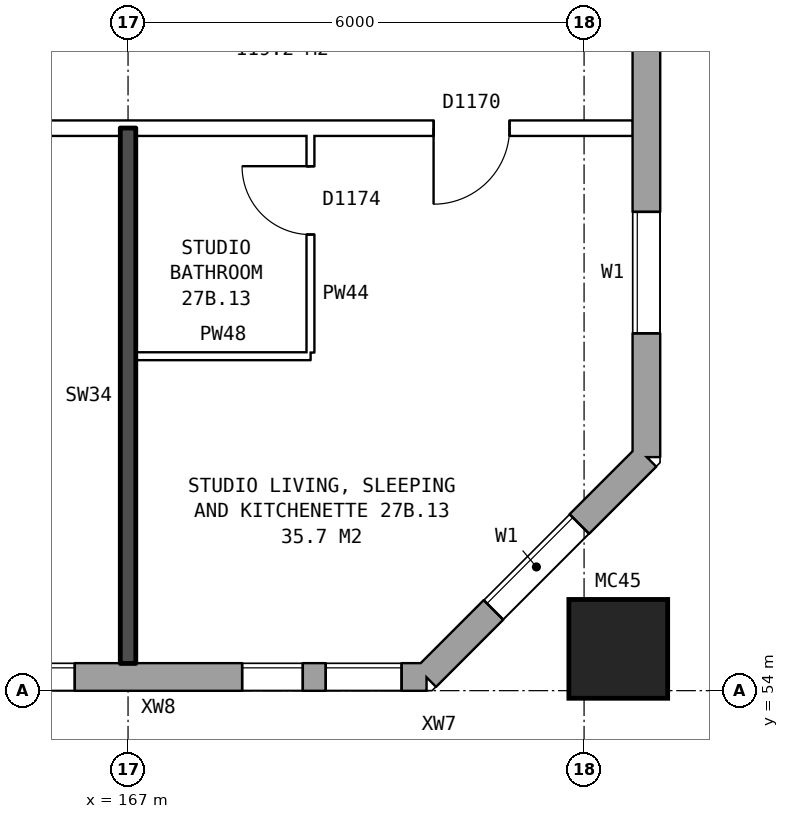
"""IFC4 building model, lengths in metres.
Left out: names, types, materials, properties, quantities, classifications, styles, units other than length and angle.
Written with IfcOpenShell. Run it as: python <this file> out.ifc"""

import sys

from ifc_helpers import new_model, si_unit, direction, frame, frame_2d, origin, origin_2d, place, context, subcontext, project, spatial, rectangle, hollow_rectangle, extrude, element, fill, save


model = new_model("IFC4")
c1 = context("Model", 3, precision=1e-05, world=origin(), true_north=direction((0.0, 1.0)))
c2 = subcontext(c1, "Body", "Model", "MODEL_VIEW")
j1 = project(units=[si_unit("LENGTHUNIT", "METRE"), si_unit("PLANEANGLEUNIT", "RADIAN")], contexts=[c1])
p1 = place(None, origin())
s1 = spatial("IfcSite", under=j1, at=p1, CompositionType="ELEMENT")
p2 = place(p1, origin())
s2 = spatial("IfcBuilding", under=s1, at=p2, CompositionType="ELEMENT")
p3 = place(p2, frame((0.0, 0.0, 99.5)))
s3 = spatial("IfcBuildingStorey", under=s2, at=p3, CompositionType="ELEMENT", Elevation=99.5)
p4 = place(p3, frame((173.45, 54.55, 0.0), z_axis=(0.0, 0.0, 1.0), x_axis=(1.0, 0.0, 0.0)))
e1 = element("IfcColumn", 1, at=p4, inside=s3, PredefinedType="COLUMN", context=c2, shape_type="SweptSolid", body=[
    extrude(hollow_rectangle(XDim=1.3, YDim=1.3, WallThickness=0.07, at=origin_2d()), origin(), (0.0, 0.0, 1.0), 3.1),
])
p5 = place(p3, frame((134.075, 54.18, 0.0), z_axis=(0.0, 0.0, 1.0), x_axis=(1.0, 0.0, 0.0)))
e2 = element("IfcWall", 2, at=p5, inside=s3, PredefinedType="STANDARD", context=c2, shape_type="SweptSolid", body=[
    extrude(rectangle(XDim=36.851, YDim=0.36, at=frame_2d((18.425, 0.0))), origin(), (0.0, 0.0, 1.0), 2.85),
])
p6 = place(p5, frame((0.3, 0.0, 0.8)))
e3 = element("IfcOpeningElement", 3, at=p6, cuts=e2, PredefinedType="OPENING", context=c2, shape_type="SweptSolid", body=[
    extrude(rectangle(XDim=1.0, YDim=1.8, at=frame_2d((0.5, 0.9))), frame((0.0, 0.19, 0.0), z_axis=(0.0, -1.0, 0.0), x_axis=(1.0, 0.0, 0.0)), (0.0, 0.0, 1.0), 0.38),
])
p7 = place(p5, frame((3.575, 0.0, 0.8)))
e4 = element("IfcOpeningElement", 4, at=p7, cuts=e2, PredefinedType="OPENING", context=c2, shape_type="SweptSolid", body=[
    extrude(rectangle(XDim=0.8, YDim=0.9, at=frame_2d((0.4, 0.45))), frame((0.0, 0.19, 0.0), z_axis=(0.0, -1.0, 0.0), x_axis=(1.0, 0.0, 0.0)), (0.0, 0.0, 1.0), 0.38),
])
p8 = place(p5, frame((6.625, 0.0, 0.8)))
e5 = element("IfcOpeningElement", 5, at=p8, cuts=e2, PredefinedType="OPENING", context=c2, shape_type="SweptSolid", body=[
    extrude(rectangle(XDim=1.6, YDim=1.8, at=frame_2d((0.8, 0.9))), frame((0.0, 0.19, 0.0), z_axis=(0.0, -1.0, 0.0), x_axis=(1.0, 0.0, 0.0)), (0.0, 0.0, 1.0), 0.38),
])
p9 = place(p5, frame((9.625, 0.0, 0.8)))
e6 = element("IfcOpeningElement", 6, at=p9, cuts=e2, PredefinedType="OPENING", context=c2, shape_type="SweptSolid", body=[
    extrude(rectangle(XDim=1.6, YDim=1.8, at=frame_2d((0.8, 0.9))), frame((0.0, 0.19, 0.0), z_axis=(0.0, -1.0, 0.0), x_axis=(1.0, 0.0, 0.0)), (0.0, 0.0, 1.0), 0.38),
])
p10 = place(p5, frame((12.625, 0.0, 0.8)))
e7 = element("IfcOpeningElement", 7, at=p10, cuts=e2, PredefinedType="OPENING", context=c2, shape_type="SweptSolid", body=[
    extrude(rectangle(XDim=1.6, YDim=1.8, at=frame_2d((0.8, 0.9))), frame((0.0, 0.19, 0.0), z_axis=(0.0, -1.0, 0.0), x_axis=(1.0, 0.0, 0.0)), (0.0, 0.0, 1.0), 0.38),
])
p11 = place(p5, frame((15.625, 0.0, 0.8)))
e8 = element("IfcOpeningElement", 8, at=p11, cuts=e2, PredefinedType="OPENING", context=c2, shape_type="SweptSolid", body=[
    extrude(rectangle(XDim=1.6, YDim=1.8, at=frame_2d((0.8, 0.9))), frame((0.0, 0.19, 0.0), z_axis=(0.0, -1.0, 0.0), x_axis=(1.0, 0.0, 0.0)), (0.0, 0.0, 1.0), 0.38),
])
p12 = place(p5, frame((18.625, 0.0, 0.8)))
e9 = element("IfcOpeningElement", 9, at=p12, cuts=e2, PredefinedType="OPENING", context=c2, shape_type="SweptSolid", body=[
    extrude(rectangle(XDim=1.6, YDim=1.8, at=frame_2d((0.8, 0.9))), frame((0.0, 0.19, 0.0), z_axis=(0.0, -1.0, 0.0), x_axis=(1.0, 0.0, 0.0)), (0.0, 0.0, 1.0), 0.38),
])
p13 = place(p5, frame((21.625, 0.0, 0.8)))
e10 = element("IfcOpeningElement", 10, at=p13, cuts=e2, PredefinedType="OPENING", context=c2, shape_type="SweptSolid", body=[
    extrude(rectangle(XDim=1.6, YDim=1.8, at=frame_2d((0.8, 0.9))), frame((0.0, 0.19, 0.0), z_axis=(0.0, -1.0, 0.0), x_axis=(1.0, 0.0, 0.0)), (0.0, 0.0, 1.0), 0.38),
])
p14 = place(p5, frame((24.625, 0.0, 0.8)))
e11 = element("IfcOpeningElement", 11, at=p14, cuts=e2, PredefinedType="OPENING", context=c2, shape_type="SweptSolid", body=[
    extrude(rectangle(XDim=1.6, YDim=1.8, at=frame_2d((0.8, 0.9))), frame((0.0, 0.19, 0.0), z_axis=(0.0, -1.0, 0.0), x_axis=(1.0, 0.0, 0.0)), (0.0, 0.0, 1.0), 0.38),
])
p15 = place(p5, frame((27.625, 0.0, 0.8)))
e12 = element("IfcOpeningElement", 12, at=p15, cuts=e2, PredefinedType="OPENING", context=c2, shape_type="SweptSolid", body=[
    extrude(rectangle(XDim=1.6, YDim=1.8, at=frame_2d((0.8, 0.9))), frame((0.0, 0.19, 0.0), z_axis=(0.0, -1.0, 0.0), x_axis=(1.0, 0.0, 0.0)), (0.0, 0.0, 1.0), 0.38),
])
p16 = place(p5, frame((30.625, 0.0, 0.8)))
e13 = element("IfcOpeningElement", 13, at=p16, cuts=e2, PredefinedType="OPENING", context=c2, shape_type="SweptSolid", body=[
    extrude(rectangle(XDim=1.6, YDim=1.8, at=frame_2d((0.8, 0.9))), frame((0.0, 0.19, 0.0), z_axis=(0.0, -1.0, 0.0), x_axis=(1.0, 0.0, 0.0)), (0.0, 0.0, 1.0), 0.38),
])
p17 = place(p5, frame((34.425, 0.0, 1.7)))
e14 = element("IfcOpeningElement", 14, at=p17, cuts=e2, PredefinedType="OPENING", context=c2, shape_type="SweptSolid", body=[
    extrude(rectangle(XDim=0.8, YDim=0.9, at=frame_2d((0.4, 0.45))), frame((0.0, 0.19, 0.0), z_axis=(0.0, -1.0, 0.0), x_axis=(1.0, 0.0, 0.0)), (0.0, 0.0, 1.0), 0.38),
])
p18 = place(p5, frame((1.6, 0.0, 1.7)))
e15 = element("IfcOpeningElement", 15, at=p18, cuts=e2, PredefinedType="OPENING", context=c2, shape_type="SweptSolid", body=[
    extrude(rectangle(XDim=0.8, YDim=0.9, at=frame_2d((0.4, 0.45))), frame((0.0, 0.19, 0.0), z_axis=(0.0, -1.0, 0.0), x_axis=(1.0, 0.0, 0.0)), (0.0, 0.0, 1.0), 0.38),
])
p19 = place(p5, frame((4.675, 0.0, 0.8)))
e16 = element("IfcOpeningElement", 16, at=p19, cuts=e2, PredefinedType="OPENING", context=c2, shape_type="SweptSolid", body=[
    extrude(rectangle(XDim=1.6, YDim=1.8, at=frame_2d((0.8, 0.9))), frame((0.0, 0.19, 0.0), z_axis=(0.0, -1.0, 0.0), x_axis=(1.0, 0.0, 0.0)), (0.0, 0.0, 1.0), 0.38),
])
p20 = place(p5, frame((35.525, 0.0, 0.8)))
e17 = element("IfcOpeningElement", 17, at=p20, cuts=e2, PredefinedType="OPENING", context=c2, shape_type="SweptSolid", body=[
    extrude(rectangle(XDim=1.0, YDim=1.8, at=frame_2d((0.5, 0.9))), frame((0.0, 0.19, 0.0), z_axis=(0.0, -1.0, 0.0), x_axis=(1.0, 0.0, 0.0)), (0.0, 0.0, 1.0), 0.38),
])
p21 = place(p3, frame((170.925, 54.18, 0.0), z_axis=(0.0, 0.0, 1.0), x_axis=(0.707106781187, 0.707106781187, 0.0)))
e18 = element("IfcWall", 18, at=p21, inside=s3, PredefinedType="STANDARD", context=c2, shape_type="SweptSolid", body=[
    extrude(rectangle(XDim=4.094, YDim=0.36, at=frame_2d((2.047, 0.0))), origin(), (0.0, 0.0, 1.0), 2.85),
])
p22 = place(p21, frame((1.247, 0.0, 0.8)))
e19 = element("IfcOpeningElement", 19, at=p22, cuts=e18, PredefinedType="OPENING", context=c2, shape_type="SweptSolid", body=[
    extrude(rectangle(XDim=1.6, YDim=1.8, at=frame_2d((0.8, 0.9))), frame((0.0, 0.19, 0.0), z_axis=(0.0, -1.0, 0.0), x_axis=(1.0, 0.0, 0.0)), (0.0, 0.0, 1.0), 0.38),
])
p23 = place(p3, frame((173.82, 57.075, 0.0), z_axis=(0.0, 0.0, 1.0), x_axis=(0.0, 1.0, 0.0)))
e20 = element("IfcWall", 20, at=p23, inside=s3, PredefinedType="STANDARD", context=c2, shape_type="SweptSolid", body=[
    extrude(rectangle(XDim=25.851, YDim=0.36, at=frame_2d((12.925, 0.0))), origin(), (0.0, 0.0, 1.0), 2.85),
])
p24 = place(p23, frame((1.625, 0.0, 0.8)))
e21 = element("IfcOpeningElement", 21, at=p24, cuts=e20, PredefinedType="OPENING", context=c2, shape_type="SweptSolid", body=[
    extrude(rectangle(XDim=1.6, YDim=1.8, at=frame_2d((0.8, 0.9))), frame((0.0, 0.19, 0.0), z_axis=(0.0, -1.0, 0.0), x_axis=(1.0, 0.0, 0.0)), (0.0, 0.0, 1.0), 0.38),
])
p25 = place(p23, frame((6.175, 0.0, 0.8)))
e22 = element("IfcOpeningElement", 22, at=p25, cuts=e20, PredefinedType="OPENING", context=c2, shape_type="SweptSolid", body=[
    extrude(rectangle(XDim=1.0, YDim=0.9, at=frame_2d((0.5, 0.45))), frame((0.0, 0.19, 0.0), z_axis=(0.0, -1.0, 0.0), x_axis=(1.0, 0.0, 0.0)), (0.0, 0.0, 1.0), 0.38),
])
p26 = place(p23, frame((7.625, 0.0, 0.8)))
e23 = element("IfcOpeningElement", 23, at=p26, cuts=e20, PredefinedType="OPENING", context=c2, shape_type="SweptSolid", body=[
    extrude(rectangle(XDim=1.6, YDim=1.8, at=frame_2d((0.8, 0.9))), frame((0.0, 0.19, 0.0), z_axis=(0.0, -1.0, 0.0), x_axis=(1.0, 0.0, 0.0)), (0.0, 0.0, 1.0), 0.38),
])
p27 = place(p23, frame((10.625, 0.0, 0.8)))
e24 = element("IfcOpeningElement", 24, at=p27, cuts=e20, PredefinedType="OPENING", context=c2, shape_type="SweptSolid", body=[
    extrude(rectangle(XDim=1.6, YDim=1.8, at=frame_2d((0.8, 0.9))), frame((0.0, 0.19, 0.0), z_axis=(0.0, -1.0, 0.0), x_axis=(1.0, 0.0, 0.0)), (0.0, 0.0, 1.0), 0.38),
])
p28 = place(p23, frame((13.625, 0.0, 0.8)))
e25 = element("IfcOpeningElement", 25, at=p28, cuts=e20, PredefinedType="OPENING", context=c2, shape_type="SweptSolid", body=[
    extrude(rectangle(XDim=1.6, YDim=1.8, at=frame_2d((0.8, 0.9))), frame((0.0, 0.19, 0.0), z_axis=(0.0, -1.0, 0.0), x_axis=(1.0, 0.0, 0.0)), (0.0, 0.0, 1.0), 0.38),
])
p29 = place(p23, frame((16.625, 0.0, 0.8)))
e26 = element("IfcOpeningElement", 26, at=p29, cuts=e20, PredefinedType="OPENING", context=c2, shape_type="SweptSolid", body=[
    extrude(rectangle(XDim=1.6, YDim=1.8, at=frame_2d((0.8, 0.9))), frame((0.0, 0.19, 0.0), z_axis=(0.0, -1.0, 0.0), x_axis=(1.0, 0.0, 0.0)), (0.0, 0.0, 1.0), 0.38),
])
p30 = place(p23, frame((9.525, 0.0, 0.8)))
e27 = element("IfcOpeningElement", 27, at=p30, cuts=e20, PredefinedType="OPENING", context=c2, shape_type="SweptSolid", body=[
    extrude(rectangle(XDim=0.8, YDim=1.8, at=frame_2d((0.4, 0.9))), frame((0.0, 0.19, 0.0), z_axis=(0.0, -1.0, 0.0), x_axis=(1.0, 0.0, 0.0)), (0.0, 0.0, 1.0), 0.38),
])
p31 = place(p23, frame((22.625, 0.0, 0.8)))
e28 = element("IfcOpeningElement", 28, at=p31, cuts=e20, PredefinedType="OPENING", context=c2, shape_type="SweptSolid", body=[
    extrude(rectangle(XDim=1.6, YDim=1.8, at=frame_2d((0.8, 0.9))), frame((0.0, 0.19, 0.0), z_axis=(0.0, -1.0, 0.0), x_axis=(1.0, 0.0, 0.0)), (0.0, 0.0, 1.0), 0.38),
])
p32 = place(p23, frame((12.525, 0.0, 0.8)))
e29 = element("IfcOpeningElement", 29, at=p32, cuts=e20, PredefinedType="OPENING", context=c2, shape_type="SweptSolid", body=[
    extrude(rectangle(XDim=0.8, YDim=1.8, at=frame_2d((0.4, 0.9))), frame((0.0, 0.19, 0.0), z_axis=(0.0, -1.0, 0.0), x_axis=(1.0, 0.0, 0.0)), (0.0, 0.0, 1.0), 0.38),
])
p33 = place(p23, frame((15.525, 0.0, 0.8)))
e30 = element("IfcOpeningElement", 30, at=p33, cuts=e20, PredefinedType="OPENING", context=c2, shape_type="SweptSolid", body=[
    extrude(rectangle(XDim=0.8, YDim=1.8, at=frame_2d((0.4, 0.9))), frame((0.0, 0.19, 0.0), z_axis=(0.0, -1.0, 0.0), x_axis=(1.0, 0.0, 0.0)), (0.0, 0.0, 1.0), 0.38),
])
p34 = place(p23, frame((18.525, 0.0, 0.8)))
e31 = element("IfcOpeningElement", 31, at=p34, cuts=e20, PredefinedType="OPENING", context=c2, shape_type="SweptSolid", body=[
    extrude(rectangle(XDim=1.0, YDim=0.9, at=frame_2d((0.5, 0.45))), frame((0.0, 0.19, 0.0), z_axis=(0.0, -1.0, 0.0), x_axis=(1.0, 0.0, 0.0)), (0.0, 0.0, 1.0), 0.38),
])
p35 = place(p3, frame((167.1, 58.4, 0.0), z_axis=(0.0, 0.0, 1.0), x_axis=(1.0, 0.0, 0.0)))
e32 = element("IfcWall", 32, at=p35, inside=s3, PredefinedType="PARTITIONING", context=c2, shape_type="SweptSolid", body=[
    extrude(rectangle(XDim=2.3, YDim=0.1, at=frame_2d((1.15, 0.0))), origin(), (0.0, 0.0, 1.0), 2.85),
])
p36 = place(p3, frame((155.1, 61.4, 0.0), z_axis=(0.0, 0.0, 1.0), x_axis=(1.0, 0.0, 0.0)))
e33 = element("IfcWall", 33, at=p36, inside=s3, PredefinedType="PARTITIONING", context=c2, shape_type="SweptSolid", body=[
    extrude(rectangle(XDim=18.54, YDim=0.2, at=frame_2d((9.27, 0.0))), origin(), (0.0, 0.0, 1.0), 2.85),
])
p37 = place(p36, frame((1.45, 0.0, 0.0)))
e34 = element("IfcOpeningElement", 34, at=p37, cuts=e33, PredefinedType="OPENING", context=c2, shape_type="SweptSolid", body=[
    extrude(rectangle(XDim=1.0, YDim=2.1, at=frame_2d((0.5, 1.05))), frame((0.0, 0.11, 0.0), z_axis=(0.0, -1.0, 0.0), x_axis=(1.0, 0.0, 0.0)), (0.0, 0.0, 1.0), 0.22),
])
p38 = place(p36, frame((9.6, 0.0, 0.0)))
e35 = element("IfcOpeningElement", 35, at=p38, cuts=e33, PredefinedType="OPENING", context=c2, shape_type="SweptSolid", body=[
    extrude(rectangle(XDim=1.0, YDim=2.1, at=frame_2d((0.5, 1.05))), frame((0.0, 0.11, 0.0), z_axis=(0.0, -1.0, 0.0), x_axis=(1.0, 0.0, 0.0)), (0.0, 0.0, 1.0), 0.22),
])
p39 = place(p36, frame((15.92, 0.0, 0.0)))
e36 = element("IfcOpeningElement", 36, at=p39, cuts=e33, PredefinedType="OPENING", context=c2, shape_type="SweptSolid", body=[
    extrude(rectangle(XDim=1.0, YDim=2.1, at=frame_2d((0.5, 1.05))), frame((0.0, 0.11, 0.0), z_axis=(0.0, -1.0, 0.0), x_axis=(1.0, 0.0, 0.0)), (0.0, 0.0, 1.0), 0.22),
])
p40 = place(p3, frame((167.0, 54.36, 0.0), z_axis=(0.0, 0.0, 1.0), x_axis=(0.0, 1.0, 0.0)))
e37 = element("IfcWall", 37, at=p40, inside=s3, PredefinedType="SOLIDWALL", context=c2, shape_type="SweptSolid", body=[
    extrude(rectangle(XDim=7.04, YDim=0.2, at=frame_2d((3.52, 0.0))), origin(), (0.0, 0.0, 1.0), 2.85),
])
p41 = place(p3, frame((169.4, 58.45, 0.0), z_axis=(0.0, 0.0, 1.0), x_axis=(0.0, 1.0, 0.0)))
e38 = element("IfcWall", 38, at=p41, inside=s3, PredefinedType="PARTITIONING", context=c2, shape_type="SweptSolid", body=[
    extrude(rectangle(XDim=2.85, YDim=0.1, at=frame_2d((1.425, 0.0))), origin(), (0.0, 0.0, 1.0), 2.85),
])
p42 = place(p41, frame((1.55, 0.0, 0.0)))
e39 = element("IfcOpeningElement", 39, at=p42, cuts=e38, PredefinedType="OPENING", context=c2, shape_type="SweptSolid", body=[
    extrude(rectangle(XDim=0.9, YDim=2.1, at=frame_2d((0.45, 1.05))), frame((0.0, 0.06, 0.0), z_axis=(0.0, -1.0, 0.0), x_axis=(1.0, 0.0, 0.0)), (0.0, 0.0, 1.0), 0.12),
])
p43 = place(p16, origin())
e40 = element("IfcWindow", 40, at=p43, inside=s3, PartitioningType="SINGLE_PANEL", PredefinedType="WINDOW", context=c2, shape_type="SweptSolid", body=[
    extrude(rectangle(XDim=1.6, YDim=1.8, at=frame_2d((0.8, 0.9))), frame((0.0, 0.15, 0.0), z_axis=(0.0, -1.0, 0.0), x_axis=(1.0, 0.0, 0.0)), (0.0, 0.0, 1.0), 0.06),
])
fill(e13, e40)
p44 = place(p17, origin())
e41 = element("IfcWindow", 41, at=p44, inside=s3, PartitioningType="SINGLE_PANEL", PredefinedType="WINDOW", context=c2, shape_type="SweptSolid", body=[
    extrude(rectangle(XDim=0.8, YDim=0.9, at=frame_2d((0.4, 0.45))), frame((0.0, 0.15, 0.0), z_axis=(0.0, -1.0, 0.0), x_axis=(1.0, 0.0, 0.0)), (0.0, 0.0, 1.0), 0.06),
])
fill(e14, e41)
p45 = place(p22, origin())
e42 = element("IfcWindow", 42, at=p45, inside=s3, PartitioningType="SINGLE_PANEL", PredefinedType="WINDOW", context=c2, shape_type="SweptSolid", body=[
    extrude(rectangle(XDim=1.6, YDim=1.8, at=frame_2d((0.8, 0.9))), frame((0.0, 0.15, 0.0), z_axis=(0.0, -1.0, 0.0), x_axis=(1.0, 0.0, 0.0)), (0.0, 0.0, 1.0), 0.06),
])
fill(e19, e42)
p46 = place(p24, origin())
e43 = element("IfcWindow", 43, at=p46, inside=s3, PartitioningType="SINGLE_PANEL", PredefinedType="WINDOW", context=c2, shape_type="SweptSolid", body=[
    extrude(rectangle(XDim=1.6, YDim=1.8, at=frame_2d((0.8, 0.9))), frame((0.0, 0.15, 0.0), z_axis=(0.0, -1.0, 0.0), x_axis=(1.0, 0.0, 0.0)), (0.0, 0.0, 1.0), 0.06),
])
fill(e21, e43)
p47 = place(p39, frame((1.0, 0.0, 0.0), z_axis=(0.0, 0.0, 1.0), x_axis=(-1.0, 0.0, 0.0)))
e44 = element("IfcDoor", 44, at=p47, inside=s3, OperationType="SINGLE_SWING_RIGHT", PredefinedType="DOOR", context=c2, shape_type="SweptSolid", body=[
    extrude(rectangle(XDim=1.0, YDim=2.1, at=frame_2d((0.5, 1.05))), frame((0.0, 0.025, 0.0), z_axis=(0.0, -1.0, 0.0), x_axis=(1.0, 0.0, 0.0)), (0.0, 0.0, 1.0), 0.05),
])
fill(e36, e44)
p48 = place(p42, origin())
e45 = element("IfcDoor", 45, at=p48, inside=s3, OperationType="SINGLE_SWING_RIGHT", PredefinedType="DOOR", context=c2, shape_type="SweptSolid", body=[
    extrude(rectangle(XDim=0.9, YDim=2.1, at=frame_2d((0.45, 1.05))), frame((0.0, 0.025, 0.0), z_axis=(0.0, -1.0, 0.0), x_axis=(1.0, 0.0, 0.0)), (0.0, 0.0, 1.0), 0.05),
])
fill(e39, e45)
p49 = place(p20, origin())
e46 = element("IfcWindow", 46, at=p49, inside=s3, PartitioningType="SINGLE_PANEL", PredefinedType="WINDOW", context=c2, shape_type="SweptSolid", body=[
    extrude(rectangle(XDim=1.0, YDim=1.8, at=frame_2d((0.5, 0.9))), frame((0.0, 0.15, 0.0), z_axis=(0.0, -1.0, 0.0), x_axis=(1.0, 0.0, 0.0)), (0.0, 0.0, 1.0), 0.06),
])
fill(e17, e46)
save(model, sys.argv[1])
